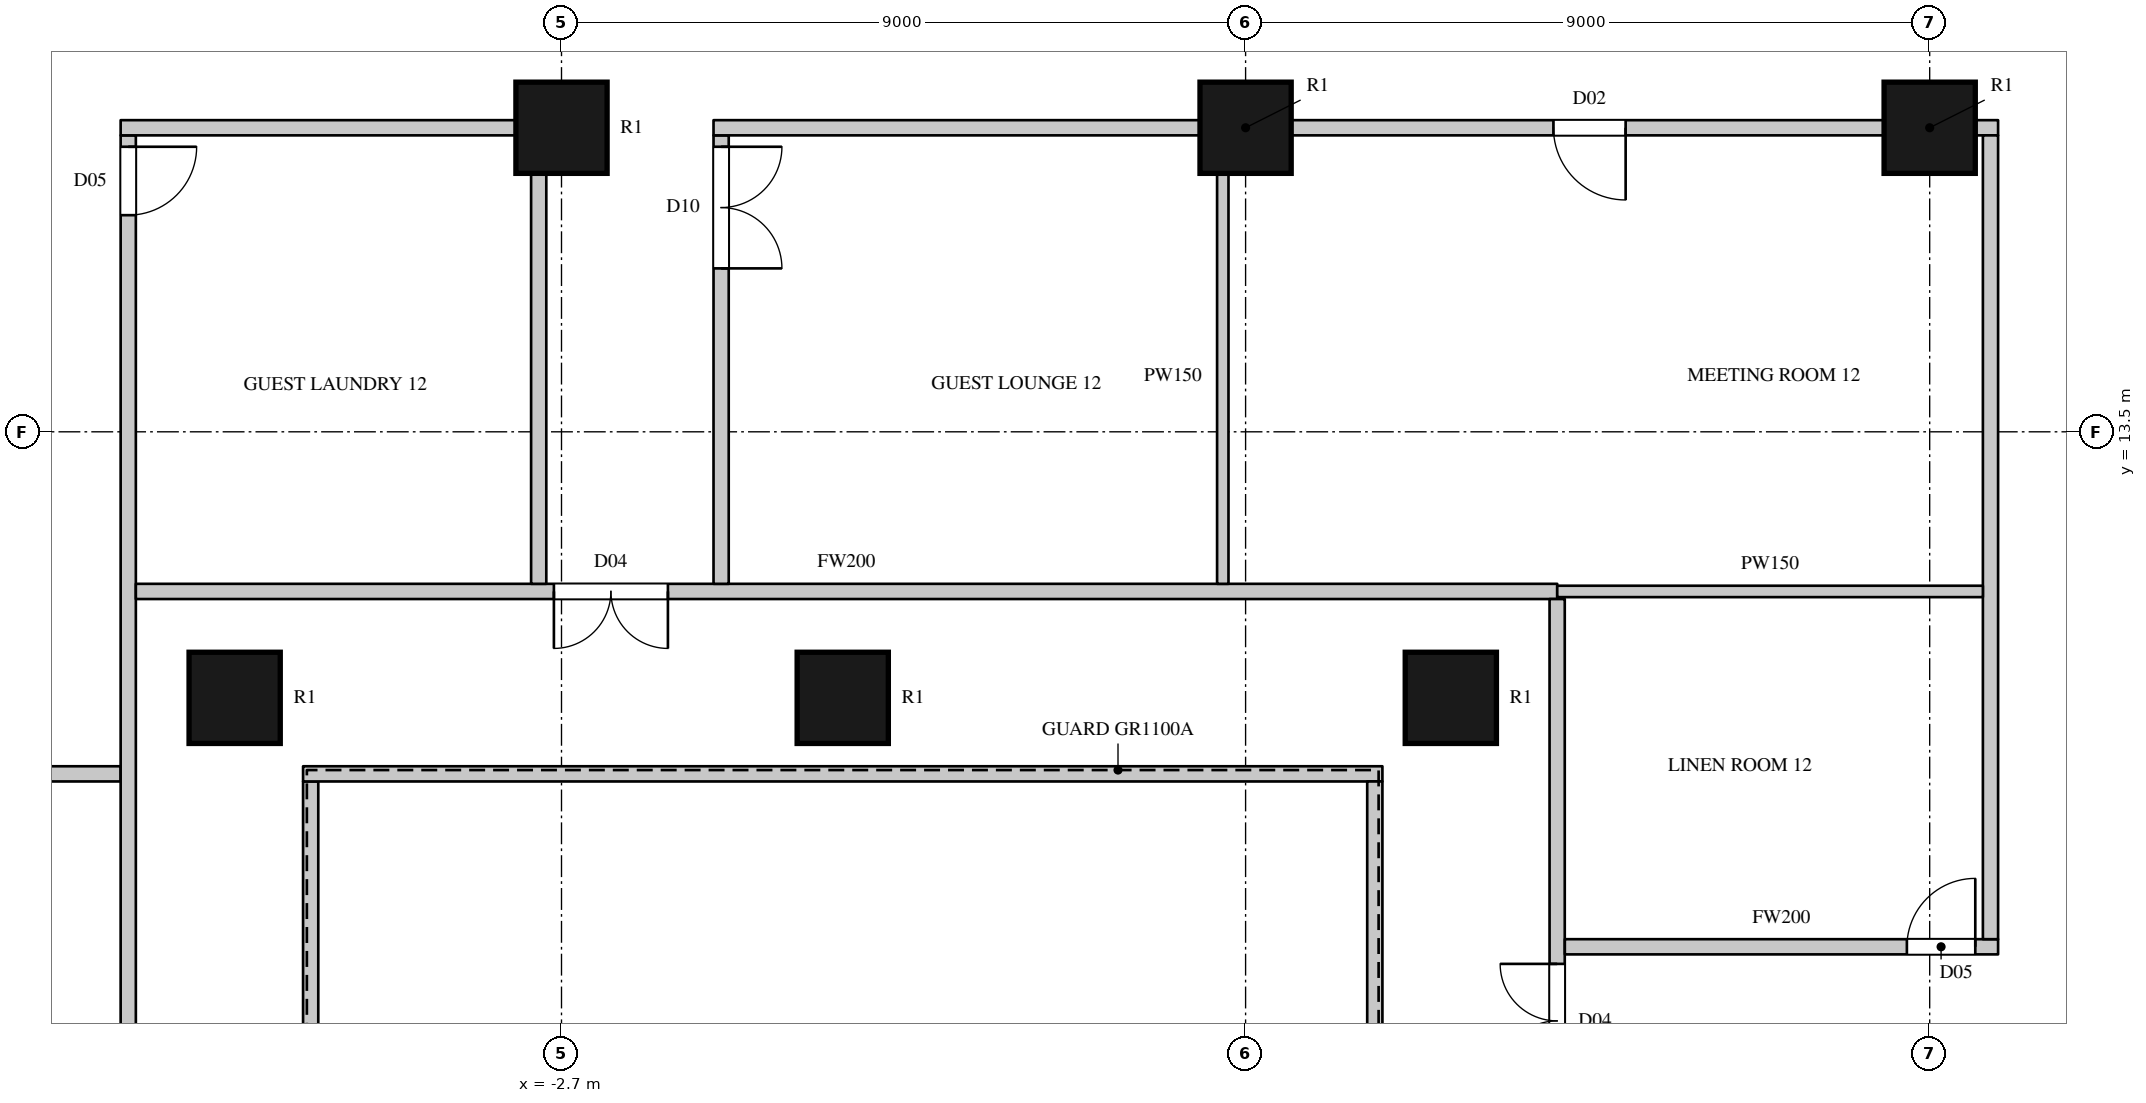
"""IFC4 building model, lengths in metres.
Left out: names, types, materials, properties, quantities, classifications, styles, units other than length and angle.
Written with IfcOpenShell. Run it as: python <this file> out.ifc"""

import sys

from ifc_helpers import new_model, si_unit, direction, frame, frame_2d, origin, origin_2d, place, context, subcontext, project, spatial, rectangle, circle, extrude, element, fill, save


model = new_model("IFC4")
c1 = context("Model", 3, precision=1e-05, world=origin(), true_north=direction((0.0, 1.0)))
c2 = subcontext(c1, "Body", "Model", "MODEL_VIEW")
j1 = project(units=[si_unit("LENGTHUNIT", "METRE"), si_unit("PLANEANGLEUNIT", "RADIAN")], contexts=[c1])
p1 = place(None, origin())
s1 = spatial("IfcSite", under=j1, at=p1, CompositionType="ELEMENT")
p2 = place(p1, origin())
s2 = spatial("IfcBuilding", under=s1, at=p2, CompositionType="ELEMENT")
p3 = place(p2, frame((0.0, 0.0, 73.5)))
s3 = spatial("IfcBuildingStorey", under=s2, at=p3, CompositionType="ELEMENT", Elevation=73.5)
for number, where, z_axis, x_axis in (
    (1, (-2.7, 17.5, 0.0), (0.0, 0.0, 1.0), (1.0, 0.0, 0.0)),
    (2, (6.3, 17.5, 0.0), (0.0, 0.0, 1.0), (1.0, 0.0, 0.0)),
    (3, (15.3, 17.5, 0.0), (0.0, 0.0, 1.0), (1.0, 0.0, 0.0)),
    (4, (-7.0, 10.0, 0.0), (0.0, 0.0, 1.0), (1.0, 0.0, 0.0)),
    (5, (1.0, 10.0, 0.0), (0.0, 0.0, 1.0), (1.0, 0.0, 0.0)),
    (6, (9.0, 10.0, 0.0), (0.0, 0.0, 1.0), (1.0, 0.0, 0.0)),
):
    element("IfcColumn", number, at=place(p3, frame(where, z_axis=z_axis, x_axis=x_axis)), inside=s3, PredefinedType="COLUMN", context=c2, shape_type="SweptSolid", body=[
        extrude(circle(Radius=0.6, at=origin_2d()), origin(), (0.0, 0.0, 1.0), 3.6),
    ])
p4 = place(p3, frame((-13.97, 9.0, 0.0), z_axis=(0.0, 0.0, 1.0), x_axis=(1.0, 0.0, 0.0)))
e7 = element("IfcWall", 7, at=p4, inside=s3, PredefinedType="PARTITIONING", context=c2, shape_type="SweptSolid", body=[
    extrude(rectangle(XDim=5.47, YDim=0.2, at=frame_2d((2.735, 0.0))), origin(), (0.0, 0.0, 1.0), 3.3),
])
p5 = place(p3, frame((-8.4, -17.4, 0.0), z_axis=(0.0, 0.0, 1.0), x_axis=(0.0, 1.0, 0.0)))
e8 = element("IfcWall", 8, at=p5, inside=s3, PredefinedType="PARTITIONING", context=c2, shape_type="SweptSolid", body=[
    extrude(rectangle(XDim=34.8, YDim=0.2, at=frame_2d((17.4, 0.0))), origin(), (0.0, 0.0, 1.0), 3.3),
])
p6 = place(p5, frame((21.15, 0.0, 0.0)))
e9 = element("IfcOpeningElement", 9, at=p6, cuts=e8, PredefinedType="OPENING", context=c2, shape_type="SweptSolid", body=[
    extrude(rectangle(XDim=1.5, YDim=2.2, at=frame_2d((0.75, 1.1))), frame((0.0, 0.11, 0.0), z_axis=(0.0, -1.0, 0.0), x_axis=(1.0, 0.0, 0.0)), (0.0, 0.0, 1.0), 0.22),
])
p7 = place(p5, frame((33.75, 0.0, 0.0)))
e10 = element("IfcOpeningElement", 10, at=p7, cuts=e8, PredefinedType="OPENING", context=c2, shape_type="SweptSolid", body=[
    extrude(rectangle(XDim=0.9, YDim=2.2, at=frame_2d((0.45, 1.1))), frame((0.0, 0.11, 0.0), z_axis=(0.0, -1.0, 0.0), x_axis=(1.0, 0.0, 0.0)), (0.0, 0.0, 1.0), 0.22),
])
p8 = place(p5, frame((0.15, 0.0, 0.0)))
e11 = element("IfcOpeningElement", 11, at=p8, cuts=e8, PredefinedType="OPENING", context=c2, shape_type="SweptSolid", body=[
    extrude(rectangle(XDim=0.95, YDim=2.2, at=frame_2d((0.475, 1.1))), frame((0.0, 0.11, 0.0), z_axis=(0.0, -1.0, 0.0), x_axis=(1.0, 0.0, 0.0)), (0.0, 0.0, 1.0), 0.22),
])
p9 = place(p3, frame((-8.3, 11.4, 0.0), z_axis=(0.0, 0.0, 1.0), x_axis=(1.0, 0.0, 0.0)))
e12 = element("IfcWall", 12, at=p9, inside=s3, PredefinedType="PARTITIONING", context=c2, shape_type="SweptSolid", body=[
    extrude(rectangle(XDim=18.7, YDim=0.2, at=frame_2d((9.35, 0.0))), origin(), (0.0, 0.0, 1.0), 3.3),
])
p10 = place(p9, frame((5.5, 0.0, 0.0)))
e13 = element("IfcOpeningElement", 13, at=p10, cuts=e12, PredefinedType="OPENING", context=c2, shape_type="SweptSolid", body=[
    extrude(rectangle(XDim=1.5, YDim=2.2, at=frame_2d((0.75, 1.1))), frame((0.0, 0.11, 0.0), z_axis=(0.0, -1.0, 0.0), x_axis=(1.0, 0.0, 0.0)), (0.0, 0.0, 1.0), 0.22),
])
p11 = place(p3, frame((-8.5, 17.5, 0.0), z_axis=(0.0, 0.0, 1.0), x_axis=(1.0, 0.0, 0.0)))
e14 = element("IfcWall", 14, at=p11, inside=s3, PredefinedType="PARTITIONING", context=c2, shape_type="SweptSolid", body=[
    extrude(rectangle(XDim=5.2, YDim=0.2, at=frame_2d((2.6, 0.0))), origin(), (0.0, 0.0, 1.0), 2.75),
])
p12 = place(p3, frame((-6.0, -8.9, 0.0), z_axis=(0.0, 0.0, 1.0), x_axis=(0.0, 1.0, 0.0)))
e15 = element("IfcWall", 15, at=p12, inside=s3, PredefinedType="PARTITIONING", context=c2, shape_type="SweptSolid", body=[
    extrude(rectangle(XDim=17.8, YDim=0.2, at=frame_2d((8.9, 0.0))), origin(), (0.0, 0.0, 1.0), 3.3),
])
p13 = place(p3, frame((-6.1, 9.0, 0.0), z_axis=(0.0, 0.0, 1.0), x_axis=(1.0, 0.0, 0.0)))
e16 = element("IfcWall", 16, at=p13, inside=s3, PredefinedType="PARTITIONING", context=c2, shape_type="SweptSolid", body=[
    extrude(rectangle(XDim=14.2, YDim=0.2, at=frame_2d((7.1, 0.0))), origin(), (0.0, 0.0, 1.0), 3.3),
])
p14 = place(p3, frame((-3.0, 11.5, 0.0), z_axis=(0.0, 0.0, 1.0), x_axis=(0.0, 1.0, 0.0)))
e17 = element("IfcWall", 17, at=p14, inside=s3, PredefinedType="PARTITIONING", context=c2, shape_type="SweptSolid", body=[
    extrude(rectangle(XDim=5.443, YDim=0.2, at=frame_2d((2.722, 0.0))), origin(), (0.0, 0.0, 1.0), 3.3),
])
p15 = place(p3, frame((-0.6, 11.5, 0.0), z_axis=(0.0, 0.0, 1.0), x_axis=(0.0, 1.0, 0.0)))
e18 = element("IfcWall", 18, at=p15, inside=s3, PredefinedType="PARTITIONING", context=c2, shape_type="SweptSolid", body=[
    extrude(rectangle(XDim=5.9, YDim=0.2, at=frame_2d((2.95, 0.0))), origin(), (0.0, 0.0, 1.0), 3.3),
])
p16 = place(p15, frame((4.15, 0.0, 0.0)))
e19 = element("IfcOpeningElement", 19, at=p16, cuts=e18, PredefinedType="OPENING", context=c2, shape_type="SweptSolid", body=[
    extrude(rectangle(XDim=1.6, YDim=2.4, at=frame_2d((0.8, 1.2))), frame((0.0, 0.11, 0.0), z_axis=(0.0, -1.0, 0.0), x_axis=(1.0, 0.0, 0.0)), (0.0, 0.0, 1.0), 0.22),
])
p17 = place(p3, frame((-0.7, 17.5, 0.0), z_axis=(0.0, 0.0, 1.0), x_axis=(1.0, 0.0, 0.0)))
e20 = element("IfcWall", 20, at=p17, inside=s3, PredefinedType="PARTITIONING", context=c2, shape_type="SweptSolid", body=[
    extrude(rectangle(XDim=6.4, YDim=0.2, at=frame_2d((3.2, 0.0))), origin(), (0.0, 0.0, 1.0), 2.75),
])
p18 = place(p3, frame((6.9, 17.5, 0.0), z_axis=(0.0, 0.0, 1.0), x_axis=(1.0, 0.0, 0.0)))
e21 = element("IfcWall", 21, at=p18, inside=s3, PredefinedType="PARTITIONING", context=c2, shape_type="SweptSolid", body=[
    extrude(rectangle(XDim=7.8, YDim=0.2, at=frame_2d((3.9, 0.0))), origin(), (0.0, 0.0, 1.0), 2.75),
])
p19 = place(p18, frame((3.45, 0.0, 0.0)))
e22 = element("IfcOpeningElement", 22, at=p19, cuts=e21, PredefinedType="OPENING", context=c2, shape_type="SweptSolid", body=[
    extrude(rectangle(XDim=0.95, YDim=2.2, at=frame_2d((0.475, 1.1))), frame((0.0, 0.11, 0.0), z_axis=(0.0, -1.0, 0.0), x_axis=(1.0, 0.0, 0.0)), (0.0, 0.0, 1.0), 0.22),
])
p20 = place(p3, frame((15.9, 17.5, 0.0), z_axis=(0.0, 0.0, 1.0), x_axis=(1.0, 0.0, 0.0)))
e23 = element("IfcWall", 23, at=p20, inside=s3, PredefinedType="PARTITIONING", context=c2, shape_type="SweptSolid", body=[
    extrude(rectangle(XDim=0.3, YDim=0.2, at=frame_2d((0.15, 0.0))), origin(), (0.0, 0.0, 1.0), 3.3),
])
p21 = place(p3, frame((8.0, -8.9, 0.0), z_axis=(0.0, 0.0, 1.0), x_axis=(0.0, 1.0, 0.0)))
e24 = element("IfcWall", 24, at=p21, inside=s3, PredefinedType="PARTITIONING", context=c2, shape_type="SweptSolid", body=[
    extrude(rectangle(XDim=17.8, YDim=0.2, at=frame_2d((8.9, 0.0))), origin(), (0.0, 0.0, 1.0), 3.3),
])
p22 = place(p3, frame((10.399, -12.5, 0.0), z_axis=(0.0, 0.0, 1.0), x_axis=(0.0, 1.0, 0.0)))
e25 = element("IfcWall", 25, at=p22, inside=s3, PredefinedType="PARTITIONING", context=c2, shape_type="SweptSolid", body=[
    extrude(rectangle(XDim=23.8, YDim=0.2, at=frame_2d((11.9, 0.0))), origin(), (0.0, 0.0, 1.0), 3.3),
])
p23 = place(p22, frame((6.0, 0.0, 0.0)))
e26 = element("IfcOpeningElement", 26, at=p23, cuts=e25, PredefinedType="OPENING", context=c2, shape_type="SweptSolid", body=[
    extrude(rectangle(XDim=1.5, YDim=2.2, at=frame_2d((0.75, 1.1))), frame((0.0, 0.11, 0.0), z_axis=(0.0, -1.0, 0.0), x_axis=(1.0, 0.0, 0.0)), (0.0, 0.0, 1.0), 0.22),
])
p24 = place(p22, frame((17.5, 0.0, 0.0)))
e27 = element("IfcOpeningElement", 27, at=p24, cuts=e25, PredefinedType="OPENING", context=c2, shape_type="SweptSolid", body=[
    extrude(rectangle(XDim=1.5, YDim=2.2, at=frame_2d((0.75, 1.1))), frame((0.0, 0.11, 0.0), z_axis=(0.0, -1.0, 0.0), x_axis=(1.0, 0.0, 0.0)), (0.0, 0.0, 1.0), 0.22),
])
p25 = place(p22, frame((7.7, 0.0, 0.0)))
e28 = element("IfcOpeningElement", 28, at=p25, cuts=e25, PredefinedType="OPENING", context=c2, shape_type="SweptSolid", body=[
    extrude(rectangle(XDim=1.5, YDim=2.2, at=frame_2d((0.75, 1.1))), frame((0.0, 0.11, 0.0), z_axis=(0.0, -1.0, 0.0), x_axis=(1.0, 0.0, 0.0)), (0.0, 0.0, 1.0), 0.22),
])
p26 = place(p22, frame((13.15, 0.0, 0.0)))
e29 = element("IfcOpeningElement", 29, at=p26, cuts=e25, PredefinedType="OPENING", context=c2, shape_type="SweptSolid", body=[
    extrude(rectangle(XDim=1.5, YDim=2.2, at=frame_2d((0.75, 1.1))), frame((0.0, 0.11, 0.0), z_axis=(0.0, -1.0, 0.0), x_axis=(1.0, 0.0, 0.0)), (0.0, 0.0, 1.0), 0.22),
])
p27 = place(p3, frame((10.5, 6.725, 0.0), z_axis=(0.0, 0.0, 1.0), x_axis=(1.0, 0.0, 0.0)))
e30 = element("IfcWall", 30, at=p27, inside=s3, PredefinedType="PARTITIONING", context=c2, shape_type="SweptSolid", body=[
    extrude(rectangle(XDim=5.7, YDim=0.2, at=frame_2d((2.85, 0.0))), origin(), (0.0, 0.0, 1.0), 3.3),
])
p28 = place(p27, frame((4.5, 0.0, 0.0)))
e31 = element("IfcOpeningElement", 31, at=p28, cuts=e30, PredefinedType="OPENING", context=c2, shape_type="SweptSolid", body=[
    extrude(rectangle(XDim=0.9, YDim=2.2, at=frame_2d((0.45, 1.1))), frame((0.0, 0.11, 0.0), z_axis=(0.0, -1.0, 0.0), x_axis=(1.0, 0.0, 0.0)), (0.0, 0.0, 1.0), 0.22),
])
p29 = place(p3, frame((16.1, 6.825, 0.0), z_axis=(0.0, 0.0, 1.0), x_axis=(0.0, 1.0, 0.0)))
e32 = element("IfcWall", 32, at=p29, inside=s3, PredefinedType="PARTITIONING", context=c2, shape_type="SweptSolid", body=[
    extrude(rectangle(XDim=10.575, YDim=0.2, at=frame_2d((5.288, 0.0))), origin(), (0.0, 0.0, 1.0), 3.3),
])
p30 = place(p3, frame((6.0, 11.5, 0.0), z_axis=(0.0, 0.0, 1.0), x_axis=(0.0, 1.0, 0.0)))
e33 = element("IfcWall", 33, at=p30, inside=s3, PredefinedType="PARTITIONING", context=c2, shape_type="SweptSolid", body=[
    extrude(rectangle(XDim=5.453, YDim=0.15, at=frame_2d((2.727, 0.0))), origin(), (0.0, 0.0, 1.0), 3.3),
])
p31 = place(p3, frame((10.4, 11.4, 0.0), z_axis=(0.0, 0.0, 1.0), x_axis=(1.0, 0.0, 0.0)))
e34 = element("IfcWall", 34, at=p31, inside=s3, PredefinedType="PARTITIONING", context=c2, shape_type="SweptSolid", body=[
    extrude(rectangle(XDim=5.6, YDim=0.15, at=frame_2d((2.8, 0.0))), origin(), (0.0, 0.0, 1.0), 3.3),
])
p32 = place(p10, origin())
e35 = element("IfcDoor", 35, at=p32, inside=s3, OperationType="DOUBLE_DOOR_SINGLE_SWING", PredefinedType="DOOR", context=c2, shape_type="SweptSolid", body=[
    extrude(rectangle(XDim=1.5, YDim=2.2, at=frame_2d((0.75, 1.1))), frame((0.0, 0.025, 0.0), z_axis=(0.0, -1.0, 0.0), x_axis=(1.0, 0.0, 0.0)), (0.0, 0.0, 1.0), 0.05),
])
fill(e13, e35)
p33 = place(p24, origin())
e36 = element("IfcDoor", 36, at=p33, inside=s3, OperationType="DOUBLE_DOOR_SINGLE_SWING", PredefinedType="DOOR", context=c2, shape_type="SweptSolid", body=[
    extrude(rectangle(XDim=1.5, YDim=2.2, at=frame_2d((0.75, 1.1))), frame((0.0, 0.025, 0.0), z_axis=(0.0, -1.0, 0.0), x_axis=(1.0, 0.0, 0.0)), (0.0, 0.0, 1.0), 0.05),
])
fill(e27, e36)
p34 = place(p7, origin())
e37 = element("IfcDoor", 37, at=p34, inside=s3, OperationType="SINGLE_SWING_LEFT", PredefinedType="DOOR", context=c2, shape_type="SweptSolid", body=[
    extrude(rectangle(XDim=0.9, YDim=2.2, at=frame_2d((0.45, 1.1))), frame((0.0, 0.025, 0.0), z_axis=(0.0, -1.0, 0.0), x_axis=(1.0, 0.0, 0.0)), (0.0, 0.0, 1.0), 0.05),
])
fill(e10, e37)
p35 = place(p16, origin())
e38 = element("IfcDoor", 38, at=p35, inside=s3, OperationType="DOUBLE_DOOR_SINGLE_SWING", PredefinedType="DOOR", context=c2, shape_type="SweptSolid", body=[
    extrude(rectangle(XDim=1.6, YDim=2.4, at=frame_2d((0.8, 1.2))), frame((0.0, 0.025, 0.0), z_axis=(0.0, -1.0, 0.0), x_axis=(1.0, 0.0, 0.0)), (0.0, 0.0, 1.0), 0.05),
])
fill(e19, e38)
p36 = place(p19, origin())
e39 = element("IfcDoor", 39, at=p36, inside=s3, OperationType="SINGLE_SWING_LEFT", PredefinedType="DOOR", context=c2, shape_type="SweptSolid", body=[
    extrude(rectangle(XDim=0.95, YDim=2.2, at=frame_2d((0.475, 1.1))), frame((0.0, 0.025, 0.0), z_axis=(0.0, -1.0, 0.0), x_axis=(1.0, 0.0, 0.0)), (0.0, 0.0, 1.0), 0.05),
])
fill(e22, e39)
p37 = place(p28, origin())
e40 = element("IfcDoor", 40, at=p37, inside=s3, OperationType="SINGLE_SWING_RIGHT", PredefinedType="DOOR", context=c2, shape_type="SweptSolid", body=[
    extrude(rectangle(XDim=0.9, YDim=2.2, at=frame_2d((0.45, 1.1))), frame((0.0, 0.025, 0.0), z_axis=(0.0, -1.0, 0.0), x_axis=(1.0, 0.0, 0.0)), (0.0, 0.0, 1.0), 0.05),
])
fill(e31, e40)
save(model, sys.argv[1])
